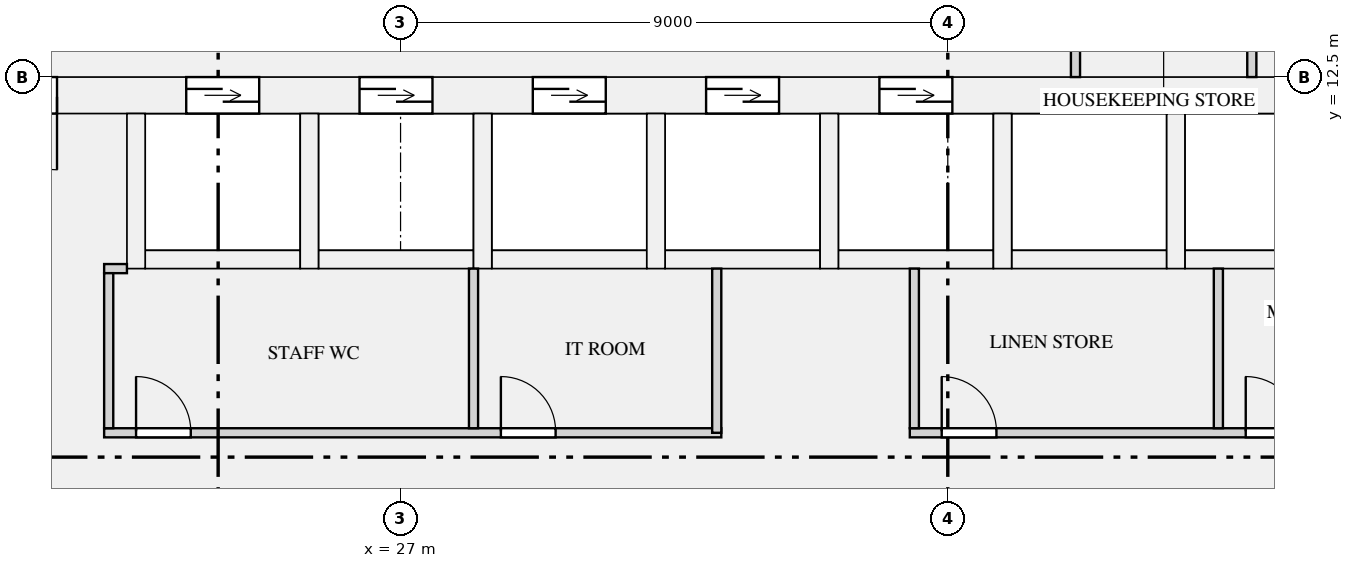
"""IFC4 building model, lengths in metres.
Left out: names, types, materials, properties, quantities, classifications, styles, units other than length and angle.
Written with IfcOpenShell. Run it as: python <this file> out.ifc"""

import sys

from ifc_helpers import new_model, si_unit, direction, frame, frame_2d, origin, place, context, subcontext, project, spatial, rectangle, extrude, element, fill, save


model = new_model("IFC4")
c1 = context("Model", 3, precision=1e-05, world=origin(), true_north=direction((0.0, 1.0)))
c2 = subcontext(c1, "Body", "Model", "MODEL_VIEW")
j1 = project(units=[si_unit("LENGTHUNIT", "METRE"), si_unit("PLANEANGLEUNIT", "RADIAN")], contexts=[c1])
p1 = place(None, origin())
s1 = spatial("IfcSite", under=j1, at=p1, CompositionType="ELEMENT")
p2 = place(p1, origin())
s2 = spatial("IfcBuilding", under=s1, at=p2, CompositionType="ELEMENT")
p3 = place(p2, frame((0.0, 0.0, 60.45)))
s3 = spatial("IfcBuildingStorey", under=s2, at=p3, CompositionType="ELEMENT", Elevation=60.45)
p4 = place(p3, frame((19.0, 12.2, 0.0), z_axis=(0.0, 0.0, 1.0), x_axis=(1.0, 0.0, 0.0)))
e1 = element("IfcWall", 1, at=p4, inside=s3, PredefinedType="SHEAR", context=c2, shape_type="SweptSolid", body=[
    extrude(rectangle(XDim=34.0, YDim=0.6, at=frame_2d((17.0, 0.0))), origin(), (0.0, 0.0, 1.0), 3.15),
])
p5 = place(p4, frame((4.475, 0.0, 0.0)))
e2 = element("IfcOpeningElement", 2, at=p5, cuts=e1, PredefinedType="OPENING", context=c2, shape_type="SweptSolid", body=[
    extrude(rectangle(XDim=1.2, YDim=2.1, at=frame_2d((0.6, 1.05))), frame((0.0, 0.31, 0.0), z_axis=(0.0, -1.0, 0.0), x_axis=(1.0, 0.0, 0.0)), (0.0, 0.0, 1.0), 0.62),
])
p6 = place(p4, frame((7.325, 0.0, 0.0)))
e3 = element("IfcOpeningElement", 3, at=p6, cuts=e1, PredefinedType="OPENING", context=c2, shape_type="SweptSolid", body=[
    extrude(rectangle(XDim=1.2, YDim=2.1, at=frame_2d((0.6, 1.05))), frame((0.0, 0.31, 0.0), z_axis=(0.0, -1.0, 0.0), x_axis=(1.0, 0.0, 0.0)), (0.0, 0.0, 1.0), 0.62),
])
p7 = place(p4, frame((10.175, 0.0, 0.0)))
e4 = element("IfcOpeningElement", 4, at=p7, cuts=e1, PredefinedType="OPENING", context=c2, shape_type="SweptSolid", body=[
    extrude(rectangle(XDim=1.2, YDim=2.1, at=frame_2d((0.6, 1.05))), frame((0.0, 0.31, 0.0), z_axis=(0.0, -1.0, 0.0), x_axis=(1.0, 0.0, 0.0)), (0.0, 0.0, 1.0), 0.62),
])
p8 = place(p4, frame((13.025, 0.0, 0.0)))
e5 = element("IfcOpeningElement", 5, at=p8, cuts=e1, PredefinedType="OPENING", context=c2, shape_type="SweptSolid", body=[
    extrude(rectangle(XDim=1.2, YDim=2.1, at=frame_2d((0.6, 1.05))), frame((0.0, 0.31, 0.0), z_axis=(0.0, -1.0, 0.0), x_axis=(1.0, 0.0, 0.0)), (0.0, 0.0, 1.0), 0.62),
])
p9 = place(p4, frame((15.875, 0.0, 0.0)))
e6 = element("IfcOpeningElement", 6, at=p9, cuts=e1, PredefinedType="OPENING", context=c2, shape_type="SweptSolid", body=[
    extrude(rectangle(XDim=1.2, YDim=2.1, at=frame_2d((0.6, 1.05))), frame((0.0, 0.31, 0.0), z_axis=(0.0, -1.0, 0.0), x_axis=(1.0, 0.0, 0.0)), (0.0, 0.0, 1.0), 0.62),
])
p10 = place(p4, frame((24.175, 0.0, 0.0)))
e7 = element("IfcOpeningElement", 7, at=p10, cuts=e1, PredefinedType="OPENING", context=c2, shape_type="SweptSolid", body=[
    extrude(rectangle(XDim=1.1, YDim=2.1, at=frame_2d((0.55, 1.05))), frame((0.0, 0.31, 0.0), z_axis=(0.0, -1.0, 0.0), x_axis=(1.0, 0.0, 0.0)), (0.0, 0.0, 1.0), 0.62),
])
p11 = place(p4, frame((26.425, 0.0, 0.0)))
e8 = element("IfcOpeningElement", 8, at=p11, cuts=e1, PredefinedType="OPENING", context=c2, shape_type="SweptSolid", body=[
    extrude(rectangle(XDim=1.1, YDim=2.1, at=frame_2d((0.55, 1.05))), frame((0.0, 0.31, 0.0), z_axis=(0.0, -1.0, 0.0), x_axis=(1.0, 0.0, 0.0)), (0.0, 0.0, 1.0), 0.62),
])
p12 = place(p4, frame((28.675, 0.0, 0.0)))
e9 = element("IfcOpeningElement", 9, at=p12, cuts=e1, PredefinedType="OPENING", context=c2, shape_type="SweptSolid", body=[
    extrude(rectangle(XDim=1.1, YDim=2.1, at=frame_2d((0.55, 1.05))), frame((0.0, 0.31, 0.0), z_axis=(0.0, -1.0, 0.0), x_axis=(1.0, 0.0, 0.0)), (0.0, 0.0, 1.0), 0.62),
])
p13 = place(p4, frame((1.15, 0.0, 0.0)))
e10 = element("IfcOpeningElement", 10, at=p13, cuts=e1, PredefinedType="OPENING", context=c2, shape_type="SweptSolid", body=[
    extrude(rectangle(XDim=1.2, YDim=2.1, at=frame_2d((0.6, 1.05))), frame((0.0, 0.31, 0.0), z_axis=(0.0, -1.0, 0.0), x_axis=(1.0, 0.0, 0.0)), (0.0, 0.0, 1.0), 0.62),
])
p14 = place(p4, frame((31.65, 0.0, 0.0)))
e11 = element("IfcOpeningElement", 11, at=p14, cuts=e1, PredefinedType="OPENING", context=c2, shape_type="SweptSolid", body=[
    extrude(rectangle(XDim=1.2, YDim=2.1, at=frame_2d((0.6, 1.05))), frame((0.0, 0.31, 0.0), z_axis=(0.0, -1.0, 0.0), x_axis=(1.0, 0.0, 0.0)), (0.0, 0.0, 1.0), 0.62),
])
p15 = place(p3, frame((22.8, 9.5, 0.0), z_axis=(0.0, 0.0, 1.0), x_axis=(1.0, 0.0, 0.0)))
e12 = element("IfcWall", 12, at=p15, inside=s3, PredefinedType="SHEAR", context=c2, shape_type="SweptSolid", body=[
    extrude(rectangle(XDim=2.55, YDim=0.3, at=frame_2d((1.275, 0.0))), origin(), (0.0, 0.0, 1.0), 3.15),
])
p16 = place(p3, frame((22.65, 9.35, 0.0), z_axis=(0.0, 0.0, 1.0), x_axis=(0.0, 1.0, 0.0)))
e13 = element("IfcWall", 13, at=p16, inside=s3, PredefinedType="SHEAR", context=c2, shape_type="SweptSolid", body=[
    extrude(rectangle(XDim=2.55, YDim=0.3, at=frame_2d((1.275, 0.0))), origin(), (0.0, 0.0, 1.0), 3.15),
])
p17 = place(p3, frame((25.65, 9.5, 0.0), z_axis=(0.0, 0.0, 1.0), x_axis=(1.0, 0.0, 0.0)))
e14 = element("IfcWall", 14, at=p17, inside=s3, PredefinedType="SHEAR", context=c2, shape_type="SweptSolid", body=[
    extrude(rectangle(XDim=2.55, YDim=0.3, at=frame_2d((1.275, 0.0))), origin(), (0.0, 0.0, 1.0), 3.15),
])
p18 = place(p3, frame((25.5, 9.35, 0.0), z_axis=(0.0, 0.0, 1.0), x_axis=(0.0, 1.0, 0.0)))
e15 = element("IfcWall", 15, at=p18, inside=s3, PredefinedType="SHEAR", context=c2, shape_type="SweptSolid", body=[
    extrude(rectangle(XDim=2.55, YDim=0.3, at=frame_2d((1.275, 0.0))), origin(), (0.0, 0.0, 1.0), 3.15),
])
p19 = place(p3, frame((28.5, 9.5, 0.0), z_axis=(0.0, 0.0, 1.0), x_axis=(1.0, 0.0, 0.0)))
e16 = element("IfcWall", 16, at=p19, inside=s3, PredefinedType="SHEAR", context=c2, shape_type="SweptSolid", body=[
    extrude(rectangle(XDim=2.55, YDim=0.3, at=frame_2d((1.275, 0.0))), origin(), (0.0, 0.0, 1.0), 3.15),
])
for number, where, z_axis, x_axis in (
    (17, (28.35, 9.35, 0.0), (0.0, 0.0, 1.0), (0.0, 1.0, 0.0)),
    (18, (31.35, 9.5, 0.0), (0.0, 0.0, 1.0), (1.0, 0.0, 0.0)),
    (19, (31.2, 9.35, 0.0), (0.0, 0.0, 1.0), (0.0, 1.0, 0.0)),
):
    element("IfcWall", number, at=place(p3, frame(where, z_axis=z_axis, x_axis=x_axis)), inside=s3, PredefinedType="SHEAR", context=c2, shape_type="SweptSolid", body=[
        extrude(rectangle(XDim=2.55, YDim=0.3, at=frame_2d((1.275, 0.0))), origin(), (0.0, 0.0, 1.0), 3.15),
    ])
p20 = place(p3, frame((34.2, 9.5, 0.0), z_axis=(0.0, 0.0, 1.0), x_axis=(1.0, 0.0, 0.0)))
e20 = element("IfcWall", 20, at=p20, inside=s3, PredefinedType="SHEAR", context=c2, shape_type="SweptSolid", body=[
    extrude(rectangle(XDim=2.55, YDim=0.3, at=frame_2d((1.275, 0.0))), origin(), (0.0, 0.0, 1.0), 3.15),
])
p21 = place(p3, frame((34.05, 9.35, 0.0), z_axis=(0.0, 0.0, 1.0), x_axis=(0.0, 1.0, 0.0)))
e21 = element("IfcWall", 21, at=p21, inside=s3, PredefinedType="SHEAR", context=c2, shape_type="SweptSolid", body=[
    extrude(rectangle(XDim=2.55, YDim=0.3, at=frame_2d((1.275, 0.0))), origin(), (0.0, 0.0, 1.0), 3.15),
])
p22 = place(p3, frame((37.05, 9.5, 0.0), z_axis=(0.0, 0.0, 1.0), x_axis=(1.0, 0.0, 0.0)))
e22 = element("IfcWall", 22, at=p22, inside=s3, PredefinedType="SHEAR", context=c2, shape_type="SweptSolid", body=[
    extrude(rectangle(XDim=2.55, YDim=0.3, at=frame_2d((1.275, 0.0))), origin(), (0.0, 0.0, 1.0), 3.15),
])
p23 = place(p3, frame((36.9, 9.35, 0.0), z_axis=(0.0, 0.0, 1.0), x_axis=(0.0, 1.0, 0.0)))
e23 = element("IfcWall", 23, at=p23, inside=s3, PredefinedType="SHEAR", context=c2, shape_type="SweptSolid", body=[
    extrude(rectangle(XDim=2.55, YDim=0.3, at=frame_2d((1.275, 0.0))), origin(), (0.0, 0.0, 1.0), 3.15),
])
p24 = place(p3, frame((39.9, 9.5, 0.0), z_axis=(0.0, 0.0, 1.0), x_axis=(1.0, 0.0, 0.0)))
e24 = element("IfcWall", 24, at=p24, inside=s3, PredefinedType="SHEAR", context=c2, shape_type="SweptSolid", body=[
    extrude(rectangle(XDim=2.55, YDim=0.3, at=frame_2d((1.275, 0.0))), origin(), (0.0, 0.0, 1.0), 3.15),
])
p25 = place(p3, frame((39.75, 9.35, 0.0), z_axis=(0.0, 0.0, 1.0), x_axis=(0.0, 1.0, 0.0)))
e25 = element("IfcWall", 25, at=p25, inside=s3, PredefinedType="SHEAR", context=c2, shape_type="SweptSolid", body=[
    extrude(rectangle(XDim=2.55, YDim=0.3, at=frame_2d((1.275, 0.0))), origin(), (0.0, 0.0, 1.0), 3.15),
])
p26 = place(p3, frame((22.125, 6.65, 0.0), z_axis=(0.0, 0.0, 1.0), x_axis=(1.0, 0.0, 0.0)))
e26 = element("IfcWall", 26, at=p26, inside=s3, PredefinedType="PARTITIONING", context=c2, shape_type="SweptSolid", body=[
    extrude(rectangle(XDim=10.15, YDim=0.15, at=frame_2d((5.075, 0.0))), origin(), (0.0, 0.0, 1.0), 2.83),
])
p27 = place(p26, frame((0.525, 0.0, 0.0)))
e27 = element("IfcOpeningElement", 27, at=p27, cuts=e26, PredefinedType="OPENING", context=c2, shape_type="SweptSolid", body=[
    extrude(rectangle(XDim=0.9, YDim=2.1, at=frame_2d((0.45, 1.05))), frame((0.0, 0.085, 0.0), z_axis=(0.0, -1.0, 0.0), x_axis=(1.0, 0.0, 0.0)), (0.0, 0.0, 1.0), 0.17),
])
p28 = place(p26, frame((6.525, 0.0, 0.0)))
e28 = element("IfcOpeningElement", 28, at=p28, cuts=e26, PredefinedType="OPENING", context=c2, shape_type="SweptSolid", body=[
    extrude(rectangle(XDim=0.9, YDim=2.1, at=frame_2d((0.45, 1.05))), frame((0.0, 0.085, 0.0), z_axis=(0.0, -1.0, 0.0), x_axis=(1.0, 0.0, 0.0)), (0.0, 0.0, 1.0), 0.17),
])
p29 = place(p3, frame((35.375, 6.65, 0.0), z_axis=(0.0, 0.0, 1.0), x_axis=(1.0, 0.0, 0.0)))
e29 = element("IfcWall", 29, at=p29, inside=s3, PredefinedType="PARTITIONING", context=c2, shape_type="SweptSolid", body=[
    extrude(rectangle(XDim=7.15, YDim=0.15, at=frame_2d((3.575, 0.0))), origin(), (0.0, 0.0, 1.0), 2.83),
])
p30 = place(p29, frame((0.525, 0.0, 0.0)))
e30 = element("IfcOpeningElement", 30, at=p30, cuts=e29, PredefinedType="OPENING", context=c2, shape_type="SweptSolid", body=[
    extrude(rectangle(XDim=0.9, YDim=2.1, at=frame_2d((0.45, 1.05))), frame((0.0, 0.085, 0.0), z_axis=(0.0, -1.0, 0.0), x_axis=(1.0, 0.0, 0.0)), (0.0, 0.0, 1.0), 0.17),
])
p31 = place(p29, frame((5.525, 0.0, 0.0)))
e31 = element("IfcOpeningElement", 31, at=p31, cuts=e29, PredefinedType="OPENING", context=c2, shape_type="SweptSolid", body=[
    extrude(rectangle(XDim=0.9, YDim=2.1, at=frame_2d((0.45, 1.05))), frame((0.0, 0.085, 0.0), z_axis=(0.0, -1.0, 0.0), x_axis=(1.0, 0.0, 0.0)), (0.0, 0.0, 1.0), 0.17),
])
p32 = place(p3, frame((22.125, 9.35, 0.0), z_axis=(0.0, 0.0, 1.0), x_axis=(1.0, 0.0, 0.0)))
e32 = element("IfcWall", 32, at=p32, inside=s3, PredefinedType="PARTITIONING", context=c2, shape_type="SweptSolid", body=[
    extrude(rectangle(XDim=0.375, YDim=0.15, at=frame_2d((0.188, 0.0))), origin(), (0.0, 0.0, 1.0), 2.83),
])
p33 = place(p3, frame((32.2, 6.65, 0.0), z_axis=(0.0, 0.0, 1.0), x_axis=(0.0, 1.0, 0.0)))
e33 = element("IfcWall", 33, at=p33, inside=s3, PredefinedType="PARTITIONING", context=c2, shape_type="SweptSolid", body=[
    extrude(rectangle(XDim=2.7, YDim=0.15, at=frame_2d((1.35, 0.0))), origin(), (0.0, 0.0, 1.0), 2.83),
])
p34 = place(p3, frame((22.2, 6.725, 0.0), z_axis=(0.0, 0.0, 1.0), x_axis=(0.0, 1.0, 0.0)))
e34 = element("IfcWall", 34, at=p34, inside=s3, PredefinedType="PARTITIONING", context=c2, shape_type="SweptSolid", body=[
    extrude(rectangle(XDim=2.55, YDim=0.15, at=frame_2d((1.275, 0.0))), origin(), (0.0, 0.0, 1.0), 2.83),
])
for number, where, z_axis, x_axis in (
    (35, (28.2, 6.725, 0.0), (0.0, 0.0, 1.0), (0.0, 1.0, 0.0)),
    (36, (35.45, 6.725, 0.0), (0.0, 0.0, 1.0), (0.0, 1.0, 0.0)),
    (37, (40.45, 6.725, 0.0), (0.0, 0.0, 1.0), (0.0, 1.0, 0.0)),
):
    element("IfcWall", number, at=place(p3, frame(where, z_axis=z_axis, x_axis=x_axis)), inside=s3, PredefinedType="PARTITIONING", context=c2, shape_type="SweptSolid", body=[
        extrude(rectangle(XDim=2.625, YDim=0.15, at=frame_2d((1.312, 0.0))), origin(), (0.0, 0.0, 1.0), 2.83),
    ])
for number, where, z_axis, x_axis in (
    (38, (38.1, 12.5, 0.0), (0.0, 0.0, 1.0), (0.0, 1.0, 0.0)),
    (39, (41.0, 12.5, 0.0), (0.0, 0.0, 1.0), (0.0, 1.0, 0.0)),
):
    element("IfcWall", number, at=place(p3, frame(where, z_axis=z_axis, x_axis=x_axis)), inside=s3, PredefinedType="PARTITIONING", context=c2, shape_type="SweptSolid", body=[
        extrude(rectangle(XDim=1.925, YDim=0.15, at=frame_2d((0.962, 0.0))), origin(), (0.0, 0.0, 1.0), 2.83),
    ])
p35 = place(p5, origin())
e40 = element("IfcDoor", 40, at=p35, inside=s3, OperationType="DOUBLE_DOOR_SLIDING", PredefinedType="DOOR", context=c2, shape_type="SweptSolid", body=[
    extrude(rectangle(XDim=1.2, YDim=2.1, at=frame_2d((0.6, 1.05))), frame((0.0, 0.025, 0.0), z_axis=(0.0, -1.0, 0.0), x_axis=(1.0, 0.0, 0.0)), (0.0, 0.0, 1.0), 0.05),
])
fill(e2, e40)
p36 = place(p6, origin())
e41 = element("IfcDoor", 41, at=p36, inside=s3, OperationType="DOUBLE_DOOR_SLIDING", PredefinedType="DOOR", context=c2, shape_type="SweptSolid", body=[
    extrude(rectangle(XDim=1.2, YDim=2.1, at=frame_2d((0.6, 1.05))), frame((0.0, 0.025, 0.0), z_axis=(0.0, -1.0, 0.0), x_axis=(1.0, 0.0, 0.0)), (0.0, 0.0, 1.0), 0.05),
])
fill(e3, e41)
p37 = place(p7, origin())
e42 = element("IfcDoor", 42, at=p37, inside=s3, OperationType="DOUBLE_DOOR_SLIDING", PredefinedType="DOOR", context=c2, shape_type="SweptSolid", body=[
    extrude(rectangle(XDim=1.2, YDim=2.1, at=frame_2d((0.6, 1.05))), frame((0.0, 0.025, 0.0), z_axis=(0.0, -1.0, 0.0), x_axis=(1.0, 0.0, 0.0)), (0.0, 0.0, 1.0), 0.05),
])
fill(e4, e42)
p38 = place(p8, origin())
e43 = element("IfcDoor", 43, at=p38, inside=s3, OperationType="DOUBLE_DOOR_SLIDING", PredefinedType="DOOR", context=c2, shape_type="SweptSolid", body=[
    extrude(rectangle(XDim=1.2, YDim=2.1, at=frame_2d((0.6, 1.05))), frame((0.0, 0.025, 0.0), z_axis=(0.0, -1.0, 0.0), x_axis=(1.0, 0.0, 0.0)), (0.0, 0.0, 1.0), 0.05),
])
fill(e5, e43)
p39 = place(p9, origin())
e44 = element("IfcDoor", 44, at=p39, inside=s3, OperationType="DOUBLE_DOOR_SLIDING", PredefinedType="DOOR", context=c2, shape_type="SweptSolid", body=[
    extrude(rectangle(XDim=1.2, YDim=2.1, at=frame_2d((0.6, 1.05))), frame((0.0, 0.025, 0.0), z_axis=(0.0, -1.0, 0.0), x_axis=(1.0, 0.0, 0.0)), (0.0, 0.0, 1.0), 0.05),
])
fill(e6, e44)
p40 = place(p27, origin())
e45 = element("IfcDoor", 45, at=p40, inside=s3, OperationType="SINGLE_SWING_LEFT", PredefinedType="DOOR", context=c2, shape_type="SweptSolid", body=[
    extrude(rectangle(XDim=0.9, YDim=2.1, at=frame_2d((0.45, 1.05))), frame((0.0, 0.025, 0.0), z_axis=(0.0, -1.0, 0.0), x_axis=(1.0, 0.0, 0.0)), (0.0, 0.0, 1.0), 0.05),
])
fill(e27, e45)
p41 = place(p28, origin())
e46 = element("IfcDoor", 46, at=p41, inside=s3, OperationType="SINGLE_SWING_LEFT", PredefinedType="DOOR", context=c2, shape_type="SweptSolid", body=[
    extrude(rectangle(XDim=0.9, YDim=2.1, at=frame_2d((0.45, 1.05))), frame((0.0, 0.025, 0.0), z_axis=(0.0, -1.0, 0.0), x_axis=(1.0, 0.0, 0.0)), (0.0, 0.0, 1.0), 0.05),
])
fill(e28, e46)
p42 = place(p30, origin())
e47 = element("IfcDoor", 47, at=p42, inside=s3, OperationType="SINGLE_SWING_LEFT", PredefinedType="DOOR", context=c2, shape_type="SweptSolid", body=[
    extrude(rectangle(XDim=0.9, YDim=2.1, at=frame_2d((0.45, 1.05))), frame((0.0, 0.025, 0.0), z_axis=(0.0, -1.0, 0.0), x_axis=(1.0, 0.0, 0.0)), (0.0, 0.0, 1.0), 0.05),
])
fill(e30, e47)
p43 = place(p31, origin())
e48 = element("IfcDoor", 48, at=p43, inside=s3, OperationType="SINGLE_SWING_LEFT", PredefinedType="DOOR", context=c2, shape_type="SweptSolid", body=[
    extrude(rectangle(XDim=0.9, YDim=2.1, at=frame_2d((0.45, 1.05))), frame((0.0, 0.025, 0.0), z_axis=(0.0, -1.0, 0.0), x_axis=(1.0, 0.0, 0.0)), (0.0, 0.0, 1.0), 0.05),
])
fill(e31, e48)
p44 = place(p13, frame((1.2, 0.0, 0.0), z_axis=(0.0, 0.0, 1.0), x_axis=(-1.0, 0.0, 0.0)))
e49 = element("IfcDoor", 49, at=p44, inside=s3, OperationType="SINGLE_SWING_LEFT", PredefinedType="DOOR", context=c2, shape_type="SweptSolid", body=[
    extrude(rectangle(XDim=1.2, YDim=2.1, at=frame_2d((0.6, 1.05))), frame((0.0, 0.025, 0.0), z_axis=(0.0, -1.0, 0.0), x_axis=(1.0, 0.0, 0.0)), (0.0, 0.0, 1.0), 0.05),
])
fill(e10, e49)
save(model, sys.argv[1])
